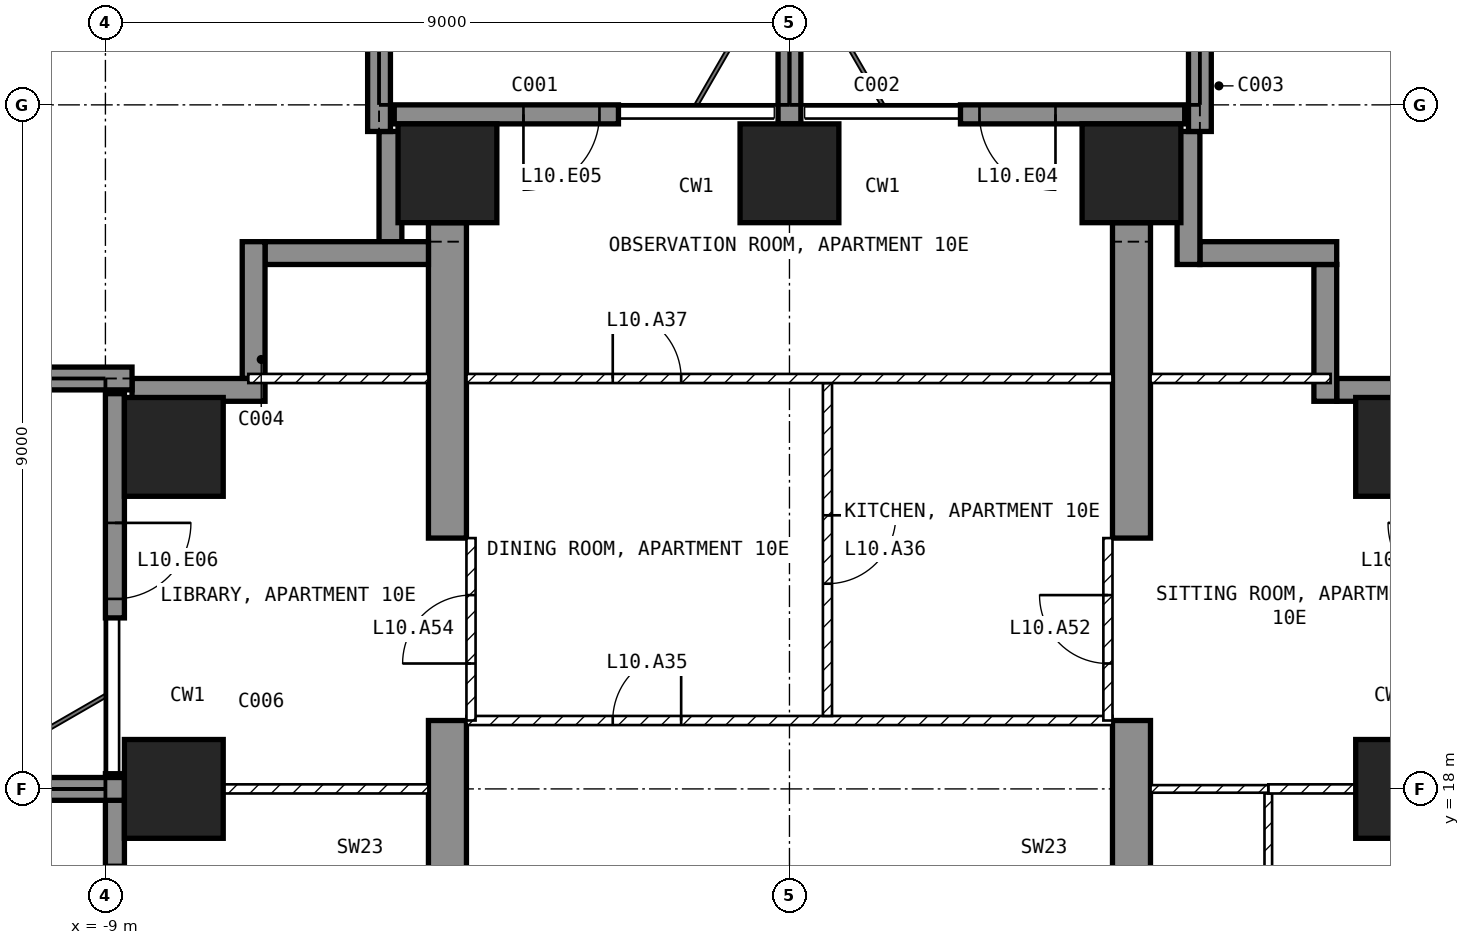
"""IFC4 building model, lengths in metres.
Left out: names, types, materials, properties, quantities, classifications, styles, units other than length and angle.
Written with IfcOpenShell. Run it as: python <this file> out.ifc"""

import sys

from ifc_helpers import new_model, si_unit, direction, frame, frame_2d, origin, origin_2d, place, context, subcontext, project, spatial, polyline, rectangle, outline, extrude, element, fill, save


model = new_model("IFC4")
c1 = context("Model", 3, precision=1e-05, world=origin(), true_north=direction((0.0, 1.0)))
c2 = subcontext(c1, "Body", "Model", "MODEL_VIEW")
j1 = project(units=[si_unit("LENGTHUNIT", "METRE"), si_unit("PLANEANGLEUNIT", "RADIAN")], contexts=[c1])
p1 = place(None, origin())
s1 = spatial("IfcSite", under=j1, at=p1, CompositionType="ELEMENT")
p2 = place(p1, origin())
s2 = spatial("IfcBuilding", under=s1, at=p2, CompositionType="ELEMENT")
p3 = place(p2, frame((0.0, 0.0, 54.0)))
s3 = spatial("IfcBuildingStorey", under=s2, at=p3, CompositionType="ELEMENT", Elevation=54.0)
for number, where, z_axis, x_axis in (
    (1, (-8.1, 18.0, -0.25), (0.0, 0.0, 1.0), (1.0, 0.0, 0.0)),
    (2, (-8.1, 22.5, -0.25), (0.0, 0.0, 1.0), (1.0, 0.0, 0.0)),
    (3, (-4.5, 26.1, -0.25), (0.0, 0.0, 1.0), (1.0, 0.0, 0.0)),
    (4, (0.0, 26.1, -0.25), (0.0, 0.0, 1.0), (1.0, 0.0, 0.0)),
    (5, (4.5, 26.1, -0.25), (0.0, 0.0, 1.0), (1.0, 0.0, 0.0)),
    (6, (8.1, 18.0, -0.25), (0.0, 0.0, 1.0), (1.0, 0.0, 0.0)),
    (7, (8.1, 22.5, -0.25), (0.0, 0.0, 1.0), (1.0, 0.0, 0.0)),
):
    element("IfcColumn", number, at=place(p3, frame(where, z_axis=z_axis, x_axis=x_axis)), inside=s3, PredefinedType="COLUMN", context=c2, shape_type="SweptSolid", body=[
        extrude(rectangle(XDim=1.3, YDim=1.3, at=origin_2d()), origin(), (0.0, 0.0, 1.0), 3.5),
    ])
for number, where, z_axis, x_axis in (
    (8, (-4.75, 9.0, -0.25), (1.0, 0.0, 0.0), (0.0, 1.0, 0.0)),
    (9, (4.25, 9.0, -0.25), (1.0, 0.0, 0.0), (0.0, 1.0, 0.0)),
):
    element("IfcWall", number, at=place(p3, frame(where, z_axis=z_axis, x_axis=x_axis)), inside=s3, PredefinedType="SHEAR", context=c2, shape_type="SweptSolid", body=[
        extrude(outline(polyline([(0.0, 0.0), (2.1, 0.0), (2.1, 2.65), (4.5, 2.65), (4.5, 0.0), (9.9, 0.0), (9.9, 2.65), (12.3, 2.65), (12.3, 0.0), (16.45, 0.0), (16.45, 3.5), (0.0, 3.5), (0.0, 0.0)])), origin(), (0.0, 0.0, 1.0), 0.5),
    ])
p4 = place(p3, frame((5.2, 26.875, 0.0), z_axis=(0.0, 0.0, 1.0), x_axis=(-1.0, 0.0, 0.0)))
e10 = element("IfcWall", 10, at=p4, inside=s3, PredefinedType="SOLIDWALL", context=c2, shape_type="SweptSolid", body=[
    extrude(rectangle(XDim=2.95, YDim=0.25, at=frame_2d((1.475, 0.0))), origin(), (0.0, 0.0, 1.0), 3.25),
])
p5 = place(p4, frame((1.7, 0.0, 0.0)))
e11 = element("IfcOpeningElement", 11, at=p5, cuts=e10, PredefinedType="OPENING", context=c2, shape_type="SweptSolid", body=[
    extrude(rectangle(XDim=1.0, YDim=2.4, at=frame_2d((0.5, 1.2))), frame((0.0, 0.135, 0.0), z_axis=(0.0, -1.0, 0.0), x_axis=(1.0, 0.0, 0.0)), (0.0, 0.0, 1.0), 0.27),
])
p6 = place(p3, frame((-2.25, 26.875, 0.0), z_axis=(0.0, 0.0, 1.0), x_axis=(-1.0, 0.0, 0.0)))
e12 = element("IfcWall", 12, at=p6, inside=s3, PredefinedType="SOLIDWALL", context=c2, shape_type="SweptSolid", body=[
    extrude(rectangle(XDim=2.95, YDim=0.25, at=frame_2d((1.475, 0.0))), origin(), (0.0, 0.0, 1.0), 3.25),
])
p7 = place(p6, frame((0.25, 0.0, 0.0)))
e13 = element("IfcOpeningElement", 13, at=p7, cuts=e12, PredefinedType="OPENING", context=c2, shape_type="SweptSolid", body=[
    extrude(rectangle(XDim=1.0, YDim=2.4, at=frame_2d((0.5, 1.2))), frame((0.0, 0.135, 0.0), z_axis=(0.0, -1.0, 0.0), x_axis=(1.0, 0.0, 0.0)), (0.0, 0.0, 1.0), 0.27),
])
p8 = place(p3, frame((-8.875, 23.2, 0.0), z_axis=(0.0, 0.0, 1.0), x_axis=(0.0, -1.0, 0.0)))
e14 = element("IfcWall", 14, at=p8, inside=s3, PredefinedType="SOLIDWALL", context=c2, shape_type="SweptSolid", body=[
    extrude(rectangle(XDim=2.95, YDim=0.25, at=frame_2d((1.475, 0.0))), origin(), (0.0, 0.0, 1.0), 3.25),
])
p9 = place(p8, frame((1.7, 0.0, 0.0)))
e15 = element("IfcOpeningElement", 15, at=p9, cuts=e14, PredefinedType="OPENING", context=c2, shape_type="SweptSolid", body=[
    extrude(rectangle(XDim=1.0, YDim=2.4, at=frame_2d((0.5, 1.2))), frame((0.0, 0.135, 0.0), z_axis=(0.0, -1.0, 0.0), x_axis=(1.0, 0.0, 0.0)), (0.0, 0.0, 1.0), 0.27),
])
p10 = place(p3, frame((-8.875, 18.2, 0.0), z_axis=(0.0, 0.0, 1.0), x_axis=(0.0, -1.0, 0.0)))
e16 = element("IfcWall", 16, at=p10, inside=s3, PredefinedType="SOLIDWALL", context=c2, shape_type="SweptSolid", body=[
    extrude(rectangle(XDim=2.65, YDim=0.25, at=frame_2d((1.325, 0.0))), origin(), (0.0, 0.0, 1.0), 3.25),
])
p11 = place(p10, frame((1.2, 0.0, 0.0)))
e17 = element("IfcOpeningElement", 17, at=p11, cuts=e16, PredefinedType="OPENING", context=c2, shape_type="SweptSolid", body=[
    extrude(rectangle(XDim=1.2, YDim=2.4, at=frame_2d((0.6, 1.2))), frame((0.0, 0.135, 0.0), z_axis=(0.0, -1.0, 0.0), x_axis=(1.0, 0.0, 0.0)), (0.0, 0.0, 1.0), 0.27),
])
p12 = place(p3, frame((8.65, 23.25, 0.0), z_axis=(0.0, 0.0, 1.0), x_axis=(-1.0, 0.0, 0.0)))
e18 = element("IfcWall", 18, at=p12, inside=s3, PredefinedType="SOLIDWALL", context=c2, shape_type="SweptSolid", body=[
    extrude(rectangle(XDim=1.45, YDim=0.3, at=frame_2d((0.725, 0.0))), origin(), (0.0, 0.0, 1.0), 3.25),
])
p13 = place(p3, frame((7.05, 23.1, 0.0), z_axis=(0.0, 0.0, 1.0), x_axis=(0.0, 1.0, 0.0)))
e19 = element("IfcWall", 19, at=p13, inside=s3, PredefinedType="SOLIDWALL", context=c2, shape_type="SweptSolid", body=[
    extrude(rectangle(XDim=1.8, YDim=0.3, at=frame_2d((0.9, 0.0))), origin(), (0.0, 0.0, 1.0), 3.25),
])
p14 = place(p3, frame((7.2, 25.05, 0.0), z_axis=(0.0, 0.0, 1.0), x_axis=(-1.0, 0.0, 0.0)))
e20 = element("IfcWall", 20, at=p14, inside=s3, PredefinedType="SOLIDWALL", context=c2, shape_type="SweptSolid", body=[
    extrude(rectangle(XDim=1.8, YDim=0.3, at=frame_2d((0.9, 0.0))), origin(), (0.0, 0.0, 1.0), 3.25),
])
p15 = place(p3, frame((5.25, 24.9, 0.0), z_axis=(0.0, 0.0, 1.0), x_axis=(0.0, 1.0, 0.0)))
e21 = element("IfcWall", 21, at=p15, inside=s3, PredefinedType="SOLIDWALL", context=c2, shape_type="SweptSolid", body=[
    extrude(rectangle(XDim=1.75, YDim=0.3, at=frame_2d((0.875, 0.0))), origin(), (0.0, 0.0, 1.0), 3.25),
])
p16 = place(p3, frame((-5.25, 26.65, 0.0), z_axis=(0.0, 0.0, 1.0), x_axis=(0.0, -1.0, 0.0)))
e22 = element("IfcWall", 22, at=p16, inside=s3, PredefinedType="SOLIDWALL", context=c2, shape_type="SweptSolid", body=[
    extrude(rectangle(XDim=1.45, YDim=0.3, at=frame_2d((0.725, 0.0))), origin(), (0.0, 0.0, 1.0), 3.25),
])
p17 = place(p3, frame((-4.75, 25.05, 0.0), z_axis=(0.0, 0.0, 1.0), x_axis=(-1.0, 0.0, 0.0)))
e23 = element("IfcWall", 23, at=p17, inside=s3, PredefinedType="SOLIDWALL", context=c2, shape_type="SweptSolid", body=[
    extrude(rectangle(XDim=2.15, YDim=0.3, at=frame_2d((1.075, 0.0))), origin(), (0.0, 0.0, 1.0), 3.25),
])
p18 = place(p3, frame((-7.05, 25.2, 0.0), z_axis=(0.0, 0.0, 1.0), x_axis=(0.0, -1.0, 0.0)))
e24 = element("IfcWall", 24, at=p18, inside=s3, PredefinedType="SOLIDWALL", context=c2, shape_type="SweptSolid", body=[
    extrude(rectangle(XDim=1.8, YDim=0.3, at=frame_2d((0.9, 0.0))), origin(), (0.0, 0.0, 1.0), 3.25),
])
p19 = place(p3, frame((-6.9, 23.25, 0.0), z_axis=(0.0, 0.0, 1.0), x_axis=(-1.0, 0.0, 0.0)))
e25 = element("IfcWall", 25, at=p19, inside=s3, PredefinedType="SOLIDWALL", context=c2, shape_type="SweptSolid", body=[
    extrude(rectangle(XDim=1.75, YDim=0.3, at=frame_2d((0.875, 0.0))), origin(), (0.0, 0.0, 1.0), 3.25),
])
p20 = place(p3, frame((-8.75, 18.0, 0.0), z_axis=(0.0, 0.0, 1.0), x_axis=(-1.0, 0.0, 0.0)))
e26 = element("IfcWall", 26, at=p20, inside=s3, PredefinedType="SOLIDWALL", context=c2, shape_type="SweptSolid", body=[
    extrude(rectangle(XDim=2.95, YDim=0.3, at=frame_2d((1.475, 0.0))), origin(), (0.0, 0.0, 1.0), 3.25),
])
for number, where, z_axis, x_axis in (
    (27, (-8.65, 23.4, 0.0), (0.0, 0.0, 1.0), (-1.0, 0.0, 0.0)),
    (28, (-5.4, 26.65, 0.0), (0.0, 0.0, 1.0), (0.0, 1.0, 0.0)),
):
    element("IfcWall", number, at=place(p3, frame(where, z_axis=z_axis, x_axis=x_axis)), inside=s3, PredefinedType="SOLIDWALL", context=c2, shape_type="SweptSolid", body=[
        extrude(rectangle(XDim=3.05, YDim=0.3, at=frame_2d((1.525, 0.0))), origin(), (0.0, 0.0, 1.0), 3.25),
    ])
p21 = place(p3, frame((0.0, 26.75, 0.0), z_axis=(0.0, 0.0, 1.0), x_axis=(0.0, 1.0, 0.0)))
e29 = element("IfcWall", 29, at=p21, inside=s3, PredefinedType="SOLIDWALL", context=c2, shape_type="SweptSolid", body=[
    extrude(rectangle(XDim=2.95, YDim=0.3, at=frame_2d((1.475, 0.0))), origin(), (0.0, 0.0, 1.0), 3.25),
])
p22 = place(p3, frame((5.4, 26.65, 0.0), z_axis=(0.0, 0.0, 1.0), x_axis=(0.0, 1.0, 0.0)))
e30 = element("IfcWall", 30, at=p22, inside=s3, PredefinedType="SOLIDWALL", context=c2, shape_type="SweptSolid", body=[
    extrude(rectangle(XDim=3.05, YDim=0.3, at=frame_2d((1.525, 0.0))), origin(), (0.0, 0.0, 1.0), 3.25),
])
p23 = place(p3, frame((-4.25, 18.9, 0.0), z_axis=(0.0, 0.0, 1.0), x_axis=(1.0, 0.0, 0.0)))
e31 = element("IfcWall", 31, at=p23, inside=s3, PredefinedType="PARTITIONING", context=c2, shape_type="SweptSolid", body=[
    extrude(rectangle(XDim=8.5, YDim=0.12, at=frame_2d((4.25, 0.0))), origin(), (0.0, 0.0, 1.0), 3.25),
])
p24 = place(p23, frame((1.925, 0.0, 0.0)))
e32 = element("IfcOpeningElement", 32, at=p24, cuts=e31, PredefinedType="OPENING", context=c2, shape_type="SweptSolid", body=[
    extrude(rectangle(XDim=0.9, YDim=2.1, at=frame_2d((0.45, 1.05))), frame((0.0, 0.07, 0.0), z_axis=(0.0, -1.0, 0.0), x_axis=(1.0, 0.0, 0.0)), (0.0, 0.0, 1.0), 0.14),
])
p25 = place(p3, frame((0.5, 23.34, 0.0), z_axis=(0.0, 0.0, 1.0), x_axis=(0.0, -1.0, 0.0)))
e33 = element("IfcWall", 33, at=p25, inside=s3, PredefinedType="PARTITIONING", context=c2, shape_type="SweptSolid", body=[
    extrude(rectangle(XDim=4.38, YDim=0.12, at=frame_2d((2.19, 0.0))), origin(), (0.0, 0.0, 1.0), 3.25),
])
p26 = place(p25, frame((1.74, 0.0, 0.0)))
e34 = element("IfcOpeningElement", 34, at=p26, cuts=e33, PredefinedType="OPENING", context=c2, shape_type="SweptSolid", body=[
    extrude(rectangle(XDim=0.9, YDim=2.1, at=frame_2d((0.45, 1.05))), frame((0.0, 0.07, 0.0), z_axis=(0.0, -1.0, 0.0), x_axis=(1.0, 0.0, 0.0)), (0.0, 0.0, 1.0), 0.14),
])
p27 = place(p3, frame((-4.25, 23.4, 0.0), z_axis=(0.0, 0.0, 1.0), x_axis=(1.0, 0.0, 0.0)))
e35 = element("IfcWall", 35, at=p27, inside=s3, PredefinedType="PARTITIONING", context=c2, shape_type="SweptSolid", body=[
    extrude(rectangle(XDim=8.5, YDim=0.12, at=frame_2d((4.25, 0.0))), origin(), (0.0, 0.0, 1.0), 3.25),
])
p28 = place(p27, frame((1.925, 0.0, 0.0)))
e36 = element("IfcOpeningElement", 36, at=p28, cuts=e35, PredefinedType="OPENING", context=c2, shape_type="SweptSolid", body=[
    extrude(rectangle(XDim=0.9, YDim=2.1, at=frame_2d((0.45, 1.05))), frame((0.0, 0.07, 0.0), z_axis=(0.0, -1.0, 0.0), x_axis=(1.0, 0.0, 0.0)), (0.0, 0.0, 1.0), 0.14),
])
p29 = place(p3, frame((6.3, 14.45, 0.0), z_axis=(0.0, 0.0, 1.0), x_axis=(0.0, 1.0, 0.0)))
e37 = element("IfcWall", 37, at=p29, inside=s3, PredefinedType="PARTITIONING", context=c2, shape_type="SweptSolid", body=[
    extrude(rectangle(XDim=3.49, YDim=0.1, at=frame_2d((1.745, 0.0))), origin(), (0.0, 0.0, 1.0), 3.25),
])
p30 = place(p3, frame((6.3, 18.0, 0.0), z_axis=(0.0, 0.0, 1.0), x_axis=(1.0, 0.0, 0.0)))
e38 = element("IfcWall", 38, at=p30, inside=s3, PredefinedType="PARTITIONING", context=c2, shape_type="SweptSolid", body=[
    extrude(rectangle(XDim=1.15, YDim=0.12, at=frame_2d((0.575, 0.0))), origin(), (0.0, 0.0, 1.0), 2.346),
])
p31 = place(p3, frame((4.75, 18.0, 0.0), z_axis=(0.0, 0.0, 1.0), x_axis=(1.0, 0.0, 0.0)))
e39 = element("IfcWall", 39, at=p31, inside=s3, PredefinedType="PARTITIONING", context=c2, shape_type="SweptSolid", body=[
    extrude(rectangle(XDim=1.55, YDim=0.1, at=frame_2d((0.775, 0.0))), origin(), (0.0, 0.0, 1.0), 2.346),
])
p32 = place(p3, frame((4.75, 23.4, 0.0), z_axis=(0.0, 0.0, 1.0), x_axis=(1.0, 0.0, 0.0)))
e40 = element("IfcWall", 40, at=p32, inside=s3, PredefinedType="PARTITIONING", context=c2, shape_type="SweptSolid", body=[
    extrude(rectangle(XDim=2.37, YDim=0.12, at=frame_2d((1.185, 0.0))), origin(), (0.0, 0.0, 1.0), 3.25),
])
p33 = place(p3, frame((-7.45, 18.0, 0.0), z_axis=(0.0, 0.0, 1.0), x_axis=(1.0, 0.0, 0.0)))
e41 = element("IfcWall", 41, at=p33, inside=s3, PredefinedType="PARTITIONING", context=c2, shape_type="SweptSolid", body=[
    extrude(rectangle(XDim=2.7, YDim=0.12, at=frame_2d((1.35, 0.0))), origin(), (0.0, 0.0, 1.0), 2.346),
])
p34 = place(p3, frame((-7.12, 23.4, 0.0), z_axis=(0.0, 0.0, 1.0), x_axis=(1.0, 0.0, 0.0)))
e42 = element("IfcWall", 42, at=p34, inside=s3, PredefinedType="PARTITIONING", context=c2, shape_type="SweptSolid", body=[
    extrude(rectangle(XDim=2.37, YDim=0.12, at=frame_2d((1.185, 0.0))), origin(), (0.0, 0.0, 1.0), 3.25),
])
p35 = place(p3, frame((4.19, 18.9, 0.0), z_axis=(0.0, 0.0, 1.0), x_axis=(0.0, 1.0, 0.0)))
e43 = element("IfcWall", 43, at=p35, inside=s3, PredefinedType="PARTITIONING", context=c2, shape_type="SweptSolid", body=[
    extrude(rectangle(XDim=2.4, YDim=0.12, at=frame_2d((1.2, 0.0))), origin(), (0.0, 0.0, 1.0), 2.4),
])
p36 = place(p35, frame((0.75, 0.0, 0.0)))
e44 = element("IfcOpeningElement", 44, at=p36, cuts=e43, PredefinedType="OPENING", context=c2, shape_type="SweptSolid", body=[
    extrude(rectangle(XDim=0.9, YDim=2.1, at=frame_2d((0.45, 1.05))), frame((0.0, 0.07, 0.0), z_axis=(0.0, -1.0, 0.0), x_axis=(1.0, 0.0, 0.0)), (0.0, 0.0, 1.0), 0.14),
])
p37 = place(p3, frame((-4.19, 18.9, 0.0), z_axis=(0.0, 0.0, 1.0), x_axis=(0.0, 1.0, 0.0)))
e45 = element("IfcWall", 45, at=p37, inside=s3, PredefinedType="PARTITIONING", context=c2, shape_type="SweptSolid", body=[
    extrude(rectangle(XDim=2.4, YDim=0.12, at=frame_2d((1.2, 0.0))), origin(), (0.0, 0.0, 1.0), 2.4),
])
p38 = place(p37, frame((0.75, 0.0, 0.0)))
e46 = element("IfcOpeningElement", 46, at=p38, cuts=e45, PredefinedType="OPENING", context=c2, shape_type="SweptSolid", body=[
    extrude(rectangle(XDim=0.9, YDim=2.1, at=frame_2d((0.45, 1.05))), frame((0.0, 0.07, 0.0), z_axis=(0.0, -1.0, 0.0), x_axis=(1.0, 0.0, 0.0)), (0.0, 0.0, 1.0), 0.14),
])
p39 = place(p5, origin())
e47 = element("IfcDoor", 47, at=p39, inside=s3, OperationType="SINGLE_SWING_LEFT", PredefinedType="DOOR", context=c2, shape_type="SweptSolid", body=[
    extrude(rectangle(XDim=1.0, YDim=2.4, at=frame_2d((0.5, 1.2))), frame((0.0, 0.025, 0.0), z_axis=(0.0, -1.0, 0.0), x_axis=(1.0, 0.0, 0.0)), (0.0, 0.0, 1.0), 0.05),
])
fill(e11, e47)
p40 = place(p7, origin())
e48 = element("IfcDoor", 48, at=p40, inside=s3, OperationType="SINGLE_SWING_RIGHT", PredefinedType="DOOR", context=c2, shape_type="SweptSolid", body=[
    extrude(rectangle(XDim=1.0, YDim=2.4, at=frame_2d((0.5, 1.2))), frame((0.0, 0.025, 0.0), z_axis=(0.0, -1.0, 0.0), x_axis=(1.0, 0.0, 0.0)), (0.0, 0.0, 1.0), 0.05),
])
fill(e13, e48)
p41 = place(p9, origin())
e49 = element("IfcDoor", 49, at=p41, inside=s3, OperationType="SINGLE_SWING_LEFT", PredefinedType="DOOR", context=c2, shape_type="SweptSolid", body=[
    extrude(rectangle(XDim=1.0, YDim=2.4, at=frame_2d((0.5, 1.2))), frame((0.0, 0.025, 0.0), z_axis=(0.0, -1.0, 0.0), x_axis=(1.0, 0.0, 0.0)), (0.0, 0.0, 1.0), 0.05),
])
fill(e15, e49)
p42 = place(p24, origin())
e50 = element("IfcDoor", 50, at=p42, inside=s3, OperationType="SINGLE_SWING_RIGHT", PredefinedType="DOOR", context=c2, shape_type="SweptSolid", body=[
    extrude(rectangle(XDim=0.9, YDim=2.1, at=frame_2d((0.45, 1.05))), frame((0.0, 0.025, 0.0), z_axis=(0.0, -1.0, 0.0), x_axis=(1.0, 0.0, 0.0)), (0.0, 0.0, 1.0), 0.05),
])
fill(e32, e50)
p43 = place(p26, origin())
e51 = element("IfcDoor", 51, at=p43, inside=s3, OperationType="SINGLE_SWING_LEFT", PredefinedType="DOOR", context=c2, shape_type="SweptSolid", body=[
    extrude(rectangle(XDim=0.9, YDim=2.1, at=frame_2d((0.45, 1.05))), frame((0.0, 0.025, 0.0), z_axis=(0.0, -1.0, 0.0), x_axis=(1.0, 0.0, 0.0)), (0.0, 0.0, 1.0), 0.05),
])
fill(e34, e51)
p44 = place(p28, origin())
e52 = element("IfcDoor", 52, at=p44, inside=s3, OperationType="SINGLE_SWING_LEFT", PredefinedType="DOOR", context=c2, shape_type="SweptSolid", body=[
    extrude(rectangle(XDim=0.9, YDim=2.1, at=frame_2d((0.45, 1.05))), frame((0.0, 0.025, 0.0), z_axis=(0.0, -1.0, 0.0), x_axis=(1.0, 0.0, 0.0)), (0.0, 0.0, 1.0), 0.05),
])
fill(e36, e52)
p45 = place(p36, origin())
e53 = element("IfcDoor", 53, at=p45, inside=s3, OperationType="SINGLE_SWING_RIGHT", PredefinedType="DOOR", context=c2, shape_type="SweptSolid", body=[
    extrude(rectangle(XDim=0.9, YDim=2.1, at=frame_2d((0.45, 1.05))), frame((0.0, 0.025, 0.0), z_axis=(0.0, -1.0, 0.0), x_axis=(1.0, 0.0, 0.0)), (0.0, 0.0, 1.0), 0.05),
])
fill(e44, e53)
p46 = place(p38, origin())
e54 = element("IfcDoor", 54, at=p46, inside=s3, OperationType="SINGLE_SWING_LEFT", PredefinedType="DOOR", context=c2, shape_type="SweptSolid", body=[
    extrude(rectangle(XDim=0.9, YDim=2.1, at=frame_2d((0.45, 1.05))), frame((0.0, 0.025, 0.0), z_axis=(0.0, -1.0, 0.0), x_axis=(1.0, 0.0, 0.0)), (0.0, 0.0, 1.0), 0.05),
])
fill(e46, e54)
save(model, sys.argv[1])
